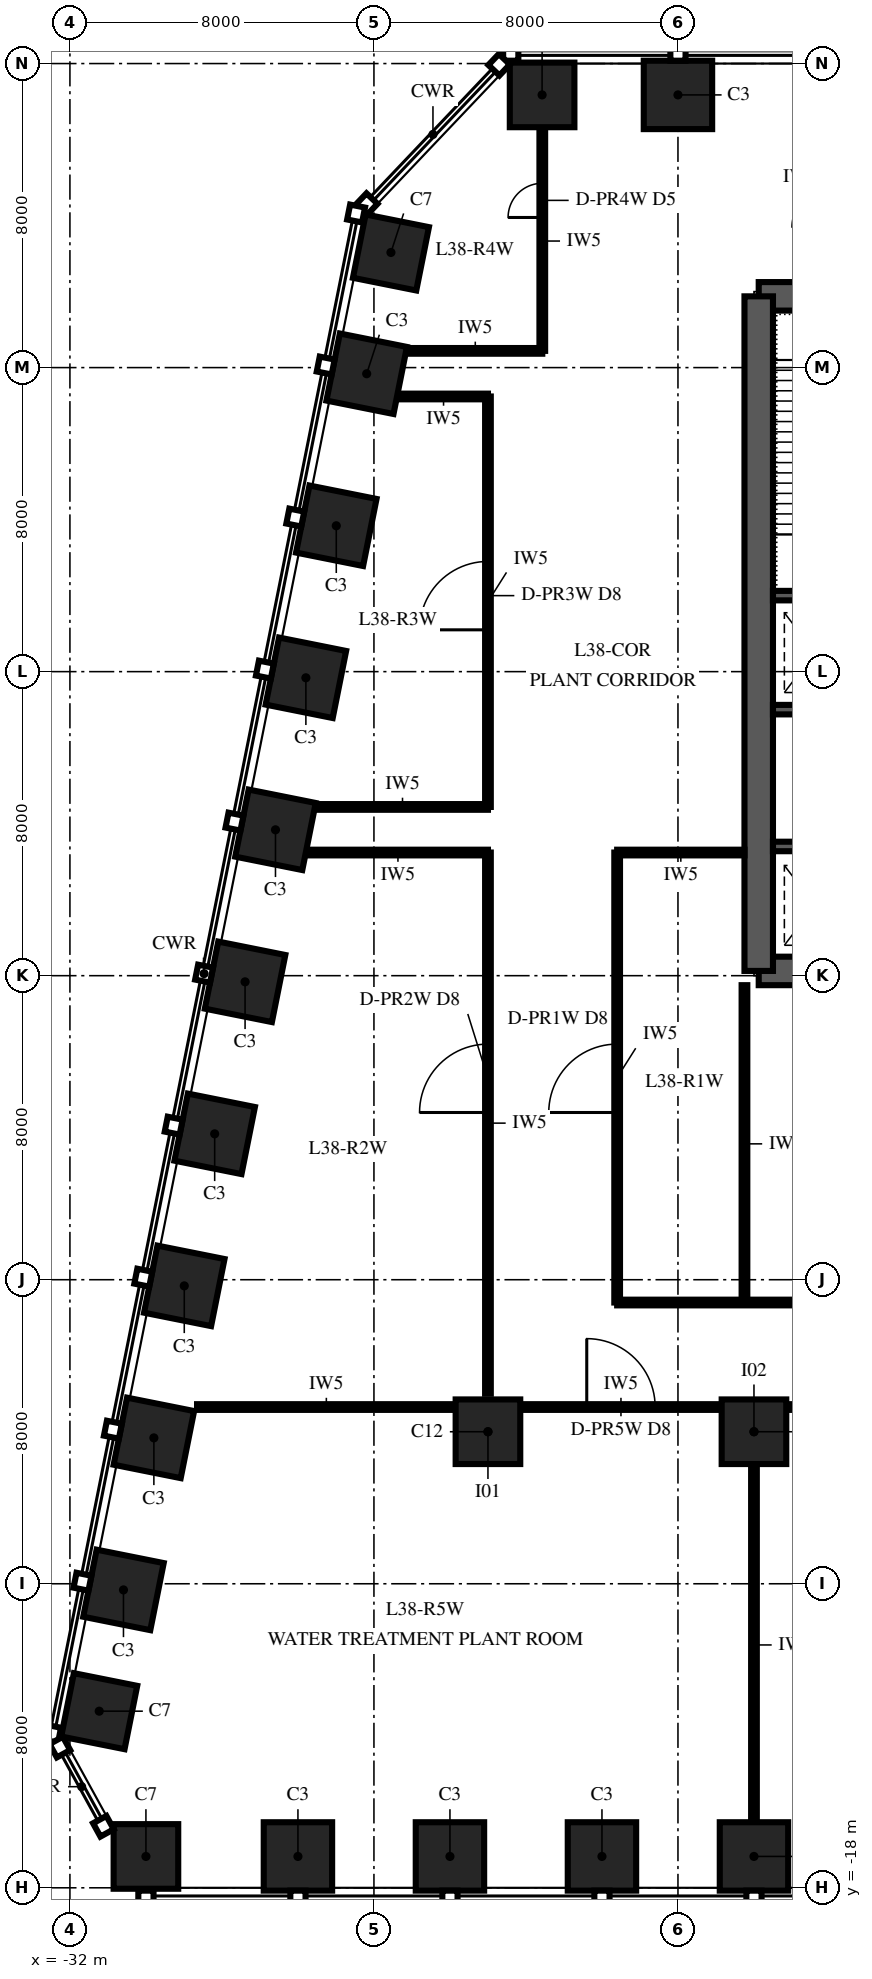
"""IFC4 building model, lengths in metres.
Left out: names, types, materials, properties, quantities, classifications, styles, units other than length and angle.
Written with IfcOpenShell. Run it as: python <this file> out.ifc"""

import sys

from ifc_helpers import new_model, si_unit, direction, frame, frame_2d, origin, origin_2d, place, context, subcontext, project, spatial, polyline, rectangle, outline, extrude, element, fill, save


model = new_model("IFC4")
c1 = context("Model", 3, precision=1e-05, world=origin(), true_north=direction((0.0, 1.0)))
c2 = subcontext(c1, "Body", "Model", "MODEL_VIEW")
j1 = project(units=[si_unit("LENGTHUNIT", "METRE"), si_unit("PLANEANGLEUNIT", "RADIAN")], contexts=[c1])
p1 = place(None, origin())
s1 = spatial("IfcSite", under=j1, at=p1, CompositionType="ELEMENT")
p2 = place(p1, origin())
s2 = spatial("IfcBuilding", under=s1, at=p2, CompositionType="ELEMENT")
p3 = place(p2, frame((0.0, 0.0, 167.0)))
s3 = spatial("IfcBuildingStorey", under=s2, at=p3, CompositionType="ELEMENT", Elevation=167.0)
p4 = place(p3, frame((-30.0, -17.175, 0.0), z_axis=(0.0, 0.0, 1.0), x_axis=(1.0, 0.0, 0.0)))
e1 = element("IfcColumn", 1, at=p4, inside=s3, PredefinedType="COLUMN", context=c2, shape_type="SweptSolid", body=[
    extrude(rectangle(XDim=1.7, YDim=1.7, at=origin_2d()), origin(), (0.0, 0.0, 1.0), 6.0),
])
for number, where, z_axis, x_axis in (
    (2, (-26.0, -17.175, 0.0), (0.0, 0.0, 1.0), (1.0, 0.0, 0.0)),
    (3, (-22.0, -17.175, 0.0), (0.0, 0.0, 1.0), (1.0, 0.0, 0.0)),
    (4, (-18.0, -17.175, 0.0), (0.0, 0.0, 1.0), (1.0, 0.0, 0.0)),
    (5, (-14.0, -17.175, 0.0), (0.0, 0.0, 1.0), (1.0, 0.0, 0.0)),
    (6, (-16.0, 29.175, 0.0), (0.0, 0.0, 1.0), (-1.0, 0.0, 0.0)),
):
    element("IfcColumn", number, at=place(p3, frame(where, z_axis=z_axis, x_axis=x_axis)), inside=s3, PredefinedType="COLUMN", context=c2, shape_type="SweptSolid", body=[
        extrude(rectangle(XDim=1.8, YDim=1.8, at=origin_2d()), origin(), (0.0, 0.0, 1.0), 6.0),
    ])
for number, where, z_axis, x_axis in (
    (7, (-19.575, 29.175, 0.0), (0.0, 0.0, 1.0), (-1.0, 0.0, 0.0)),
    (8, (-23.553, 25.029, 0.0), (0.0, 0.0, 1.0), (-0.196, -0.981, 0.0)),
):
    element("IfcColumn", number, at=place(p3, frame(where, z_axis=z_axis, x_axis=x_axis)), inside=s3, PredefinedType="COLUMN", context=c2, shape_type="SweptSolid", body=[
        extrude(rectangle(XDim=1.7, YDim=1.7, at=origin_2d()), origin(), (0.0, 0.0, 1.0), 6.0),
    ])
for number, where, z_axis, x_axis in (
    (9, (-24.191, 21.838, 0.0), (0.0, 0.0, 1.0), (-0.196, -0.981, 0.0)),
    (10, (-24.991, 17.838, 0.0), (0.0, 0.0, 1.0), (-0.196, -0.981, 0.0)),
    (11, (-25.791, 13.838, 0.0), (0.0, 0.0, 1.0), (-0.196, -0.981, 0.0)),
    (12, (-26.591, 9.838, 0.0), (0.0, 0.0, 1.0), (-0.196, -0.981, 0.0)),
    (13, (-27.391, 5.838, 0.0), (0.0, 0.0, 1.0), (-0.196, -0.981, 0.0)),
    (14, (-28.191, 1.838, 0.0), (0.0, 0.0, 1.0), (-0.196, -0.981, 0.0)),
    (15, (-28.991, -2.162, 0.0), (0.0, 0.0, 1.0), (-0.196, -0.981, 0.0)),
    (16, (-29.791, -6.162, 0.0), (0.0, 0.0, 1.0), (-0.196, -0.981, 0.0)),
    (17, (-30.591, -10.162, 0.0), (0.0, 0.0, 1.0), (-0.196, -0.981, 0.0)),
):
    element("IfcColumn", number, at=place(p3, frame(where, z_axis=z_axis, x_axis=x_axis)), inside=s3, PredefinedType="COLUMN", context=c2, shape_type="SweptSolid", body=[
        extrude(rectangle(XDim=1.8, YDim=1.8, at=origin_2d()), origin(), (0.0, 0.0, 1.0), 6.0),
    ])
for number, where, z_axis, x_axis in (
    (18, (-31.229, -13.353, 0.0), (0.0, 0.0, 1.0), (-0.196, -0.981, 0.0)),
    (19, (-21.0, -6.0, 0.0), (0.0, 0.0, 1.0), (1.0, 0.0, 0.0)),
    (20, (-14.0, -6.0, 0.0), (0.0, 0.0, 1.0), (1.0, 0.0, 0.0)),
):
    element("IfcColumn", number, at=place(p3, frame(where, z_axis=z_axis, x_axis=x_axis)), inside=s3, PredefinedType="COLUMN", context=c2, shape_type="SweptSolid", body=[
        extrude(rectangle(XDim=1.7, YDim=1.7, at=origin_2d()), origin(), (0.0, 0.0, 1.0), 6.0),
    ])
p5 = place(p3, frame((-13.875, 6.125, 0.0), z_axis=(0.0, 0.0, 1.0), x_axis=(1.0, 0.0, 0.0)))
e21 = element("IfcWall", 21, at=p5, inside=s3, PredefinedType="SHEAR", context=c2, shape_type="SweptSolid", body=[
    extrude(rectangle(XDim=27.75, YDim=0.75, at=frame_2d((13.875, 0.0))), origin(), (0.0, 0.0, 1.0), 6.0),
])
p6 = place(p3, frame((13.875, 23.875, 0.0), z_axis=(0.0, 0.0, 1.0), x_axis=(-1.0, 0.0, 0.0)))
e22 = element("IfcWall", 22, at=p6, inside=s3, PredefinedType="SHEAR", context=c2, shape_type="SweptSolid", body=[
    extrude(rectangle(XDim=27.75, YDim=0.75, at=frame_2d((13.875, 0.0))), origin(), (0.0, 0.0, 1.0), 6.0),
])
p7 = place(p6, frame((21.775, 0.0, 0.0)))
e23 = element("IfcOpeningElement", 23, at=p7, cuts=e22, PredefinedType="OPENING", context=c2, shape_type="SweptSolid", body=[
    extrude(rectangle(XDim=1.0, YDim=2.1, at=frame_2d((0.5, 1.05))), frame((0.0, 0.39, 0.0), z_axis=(0.0, -1.0, 0.0), x_axis=(1.0, 0.0, 0.0)), (0.0, 0.0, 1.0), 0.78),
])
p8 = place(p6, frame((4.975, 0.0, 0.0)))
e24 = element("IfcOpeningElement", 24, at=p8, cuts=e22, PredefinedType="OPENING", context=c2, shape_type="SweptSolid", body=[
    extrude(rectangle(XDim=1.0, YDim=2.1, at=frame_2d((0.5, 1.05))), frame((0.0, 0.39, 0.0), z_axis=(0.0, -1.0, 0.0), x_axis=(1.0, 0.0, 0.0)), (0.0, 0.0, 1.0), 0.78),
])
p9 = place(p6, frame((17.375, 0.0, 0.0)))
e25 = element("IfcOpeningElement", 25, at=p9, cuts=e22, PredefinedType="OPENING", context=c2, shape_type="SweptSolid", body=[
    extrude(rectangle(XDim=1.0, YDim=2.1, at=frame_2d((0.5, 1.05))), frame((0.0, 0.39, 0.0), z_axis=(0.0, -1.0, 0.0), x_axis=(1.0, 0.0, 0.0)), (0.0, 0.0, 1.0), 0.78),
])
p10 = place(p6, frame((13.375, 0.0, 0.0)))
e26 = element("IfcOpeningElement", 26, at=p10, cuts=e22, PredefinedType="OPENING", context=c2, shape_type="SweptSolid", body=[
    extrude(rectangle(XDim=1.0, YDim=2.1, at=frame_2d((0.5, 1.05))), frame((0.0, 0.39, 0.0), z_axis=(0.0, -1.0, 0.0), x_axis=(1.0, 0.0, 0.0)), (0.0, 0.0, 1.0), 0.78),
])
p11 = place(p6, frame((9.375, 0.0, 0.0)))
e27 = element("IfcOpeningElement", 27, at=p11, cuts=e22, PredefinedType="OPENING", context=c2, shape_type="SweptSolid", body=[
    extrude(rectangle(XDim=1.0, YDim=2.1, at=frame_2d((0.5, 1.05))), frame((0.0, 0.39, 0.0), z_axis=(0.0, -1.0, 0.0), x_axis=(1.0, 0.0, 0.0)), (0.0, 0.0, 1.0), 0.78),
])
p12 = place(p3, frame((-13.875, 23.875, 0.0), z_axis=(0.0, 0.0, 1.0), x_axis=(0.0, -1.0, 0.0)))
e28 = element("IfcWall", 28, at=p12, inside=s3, PredefinedType="SHEAR", context=c2, shape_type="SweptSolid", body=[
    extrude(outline(polyline([(0.0, -0.375), (17.75, -0.375), (17.75, 0.0), (17.375, 0.0), (17.375, 0.375), (0.375, 0.375), (0.375, 0.0), (0.0, 0.0), (0.0, -0.375)])), origin(), (0.0, 0.0, 1.0), 6.0),
])
for number, where, z_axis, x_axis in (
    (29, (-13.5, 9.4, 0.0), (0.0, 0.0, 1.0), (1.0, 0.0, 0.0)),
    (30, (-13.5, 13.0, 0.0), (0.0, 0.0, 1.0), (1.0, 0.0, 0.0)),
    (31, (-13.5, 16.0, 0.0), (0.0, 0.0, 1.0), (1.0, 0.0, 0.0)),
):
    element("IfcWall", number, at=place(p3, frame(where, z_axis=z_axis, x_axis=x_axis)), inside=s3, PredefinedType="SHEAR", context=c2, shape_type="SweptSolid", body=[
        extrude(rectangle(XDim=27.0, YDim=0.25, at=frame_2d((13.5, 0.0))), origin(), (0.0, 0.0, 1.0), 6.0),
    ])
p13 = place(p3, frame((-17.6, -2.6, 0.0), z_axis=(0.0, 0.0, 1.0), x_axis=(0.0, 1.0, 0.0)))
e32 = element("IfcWall", 32, at=p13, inside=s3, PredefinedType="PARTITIONING", context=c2, shape_type="SweptSolid", body=[
    extrude(rectangle(XDim=11.84, YDim=0.15, at=frame_2d((5.92, 0.0))), origin(), (0.0, 0.0, 1.0), 5.8),
])
p14 = place(p13, frame((5.0, 0.0, 0.0)))
e33 = element("IfcOpeningElement", 33, at=p14, cuts=e32, PredefinedType="OPENING", context=c2, shape_type="SweptSolid", body=[
    extrude(rectangle(XDim=1.8, YDim=2.4, at=frame_2d((0.9, 1.2))), frame((0.0, 0.09, 0.0), z_axis=(0.0, -1.0, 0.0), x_axis=(1.0, 0.0, 0.0)), (0.0, 0.0, 1.0), 0.18),
])
p15 = place(p3, frame((-21.0, -5.0, 0.0), z_axis=(0.0, 0.0, 1.0), x_axis=(0.0, 1.0, 0.0)))
e34 = element("IfcWall", 34, at=p15, inside=s3, PredefinedType="PARTITIONING", context=c2, shape_type="SweptSolid", body=[
    extrude(rectangle(XDim=14.24, YDim=0.15, at=frame_2d((7.12, 0.0))), origin(), (0.0, 0.0, 1.0), 5.8),
])
p16 = place(p15, frame((7.4, 0.0, 0.0)))
e35 = element("IfcOpeningElement", 35, at=p16, cuts=e34, PredefinedType="OPENING", context=c2, shape_type="SweptSolid", body=[
    extrude(rectangle(XDim=1.8, YDim=2.4, at=frame_2d((0.9, 1.2))), frame((0.0, 0.09, 0.0), z_axis=(0.0, -1.0, 0.0), x_axis=(1.0, 0.0, 0.0)), (0.0, 0.0, 1.0), 0.18),
])
p17 = place(p3, frame((-21.0, 10.44, 0.0), z_axis=(0.0, 0.0, 1.0), x_axis=(0.0, 1.0, 0.0)))
e36 = element("IfcWall", 36, at=p17, inside=s3, PredefinedType="PARTITIONING", context=c2, shape_type="SweptSolid", body=[
    extrude(rectangle(XDim=10.8, YDim=0.15, at=frame_2d((5.4, 0.0))), origin(), (0.0, 0.0, 1.0), 5.8),
])
p18 = place(p17, frame((4.66, 0.0, 0.0)))
e37 = element("IfcOpeningElement", 37, at=p18, cuts=e36, PredefinedType="OPENING", context=c2, shape_type="SweptSolid", body=[
    extrude(rectangle(XDim=1.8, YDim=2.4, at=frame_2d((0.9, 1.2))), frame((0.0, 0.09, 0.0), z_axis=(0.0, -1.0, 0.0), x_axis=(1.0, 0.0, 0.0)), (0.0, 0.0, 1.0), 0.18),
])
p19 = place(p3, frame((-14.25, -2.6, 0.0), z_axis=(0.0, 0.0, 1.0), x_axis=(0.0, 1.0, 0.0)))
e38 = element("IfcWall", 38, at=p19, inside=s3, PredefinedType="PARTITIONING", context=c2, shape_type="SweptSolid", body=[
    extrude(rectangle(XDim=8.35, YDim=0.15, at=frame_2d((4.175, 0.0))), origin(), (0.0, 0.0, 1.0), 5.8),
])
p20 = place(p3, frame((-14.25, 9.24, 0.0), z_axis=(0.0, 0.0, 1.0), x_axis=(-1.0, 0.0, 0.0)))
e39 = element("IfcWall", 39, at=p20, inside=s3, PredefinedType="PARTITIONING", context=c2, shape_type="SweptSolid", body=[
    extrude(rectangle(XDim=3.35, YDim=0.15, at=frame_2d((1.675, 0.0))), origin(), (0.0, 0.0, 1.0), 5.18),
])
p21 = place(p3, frame((-21.0, 9.24, 0.0), z_axis=(0.0, 0.0, 1.0), x_axis=(-1.0, 0.0, 0.0)))
e40 = element("IfcWall", 40, at=p21, inside=s3, PredefinedType="PARTITIONING", context=c2, shape_type="SweptSolid", body=[
    extrude(rectangle(XDim=4.737, YDim=0.15, at=frame_2d((2.368, 0.0))), origin(), (0.0, 0.0, 1.0), 5.8),
])
p22 = place(p3, frame((-21.0, 10.44, 0.0), z_axis=(0.0, 0.0, 1.0), x_axis=(-1.0, 0.0, 0.0)))
e41 = element("IfcWall", 41, at=p22, inside=s3, PredefinedType="PARTITIONING", context=c2, shape_type="SweptSolid", body=[
    extrude(rectangle(XDim=4.497, YDim=0.15, at=frame_2d((2.248, 0.0))), origin(), (0.0, 0.0, 1.0), 5.8),
])
p23 = place(p3, frame((-21.0, 21.24, 0.0), z_axis=(0.0, 0.0, 1.0), x_axis=(-1.0, 0.0, 0.0)))
e42 = element("IfcWall", 42, at=p23, inside=s3, PredefinedType="PARTITIONING", context=c2, shape_type="SweptSolid", body=[
    extrude(rectangle(XDim=2.337, YDim=0.15, at=frame_2d((1.168, 0.0))), origin(), (0.0, 0.0, 1.0), 5.8),
])
p24 = place(p3, frame((-19.57, 22.44, 0.0), z_axis=(0.0, 0.0, 1.0), x_axis=(-1.0, 0.0, 0.0)))
e43 = element("IfcWall", 43, at=p24, inside=s3, PredefinedType="PARTITIONING", context=c2, shape_type="SweptSolid", body=[
    extrude(rectangle(XDim=3.527, YDim=0.15, at=frame_2d((1.763, 0.0))), origin(), (0.0, 0.0, 1.0), 5.8),
])
p25 = place(p3, frame((-19.57, 22.44, 0.0), z_axis=(0.0, 0.0, 1.0), x_axis=(0.0, 1.0, 0.0)))
e44 = element("IfcWall", 44, at=p25, inside=s3, PredefinedType="PARTITIONING", context=c2, shape_type="SweptSolid", body=[
    extrude(rectangle(XDim=5.78, YDim=0.15, at=frame_2d((2.89, 0.0))), origin(), (0.0, 0.0, 1.0), 5.368),
])
p26 = place(p25, frame((3.51, 0.0, 0.0)))
e45 = element("IfcOpeningElement", 45, at=p26, cuts=e44, PredefinedType="OPENING", context=c2, shape_type="SweptSolid", body=[
    extrude(rectangle(XDim=0.9, YDim=2.1, at=frame_2d((0.45, 1.05))), frame((0.0, 0.09, 0.0), z_axis=(0.0, -1.0, 0.0), x_axis=(1.0, 0.0, 0.0)), (0.0, 0.0, 1.0), 0.18),
])
p27 = place(p3, frame((-14.0, -7.0, 0.0), z_axis=(0.0, 0.0, 1.0), x_axis=(0.0, -1.0, 0.0)))
e46 = element("IfcWall", 46, at=p27, inside=s3, PredefinedType="PARTITIONING", context=c2, shape_type="SweptSolid", body=[
    extrude(rectangle(XDim=9.22, YDim=0.15, at=frame_2d((4.61, 0.0))), origin(), (0.0, 0.0, 1.0), 5.18),
])
p28 = place(p3, frame((-28.655, -5.35, 0.0), z_axis=(0.0, 0.0, 1.0), x_axis=(1.0, 0.0, 0.0)))
e47 = element("IfcWall", 47, at=p28, inside=s3, PredefinedType="PARTITIONING", context=c2, shape_type="SweptSolid", body=[
    extrude(rectangle(XDim=6.805, YDim=0.15, at=frame_2d((3.402, 0.0))), origin(), (0.0, 0.0, 1.0), 5.8),
])
p29 = place(p3, frame((-20.15, -5.35, 0.0), z_axis=(0.0, 0.0, 1.0), x_axis=(1.0, 0.0, 0.0)))
e48 = element("IfcWall", 48, at=p29, inside=s3, PredefinedType="PARTITIONING", context=c2, shape_type="SweptSolid", body=[
    extrude(rectangle(XDim=5.3, YDim=0.15, at=frame_2d((2.65, 0.0))), origin(), (0.0, 0.0, 1.0), 5.8),
])
p30 = place(p29, frame((1.75, 0.0, 0.0)))
e49 = element("IfcOpeningElement", 49, at=p30, cuts=e48, PredefinedType="OPENING", context=c2, shape_type="SweptSolid", body=[
    extrude(rectangle(XDim=1.8, YDim=2.4, at=frame_2d((0.9, 1.2))), frame((0.0, 0.09, 0.0), z_axis=(0.0, -1.0, 0.0), x_axis=(1.0, 0.0, 0.0)), (0.0, 0.0, 1.0), 0.18),
])
p31 = place(p3, frame((-13.15, -5.35, 0.0), z_axis=(0.0, 0.0, 1.0), x_axis=(1.0, 0.0, 0.0)))
e50 = element("IfcWall", 50, at=p31, inside=s3, PredefinedType="PARTITIONING", context=c2, shape_type="SweptSolid", body=[
    extrude(rectangle(XDim=5.3, YDim=0.15, at=frame_2d((2.65, 0.0))), origin(), (0.0, 0.0, 1.0), 5.8),
])
p32 = place(p3, frame((-17.6, -2.6, 0.0), z_axis=(0.0, 0.0, 1.0), x_axis=(1.0, 0.0, 0.0)))
e51 = element("IfcWall", 51, at=p32, inside=s3, PredefinedType="PARTITIONING", context=c2, shape_type="SweptSolid", body=[
    extrude(rectangle(XDim=35.2, YDim=0.15, at=frame_2d((17.6, 0.0))), origin(), (0.0, 0.0, 1.0), 5.8),
])
p33 = place(p32, frame((9.7, 0.0, 0.0)))
e52 = element("IfcOpeningElement", 52, at=p33, cuts=e51, PredefinedType="OPENING", context=c2, shape_type="SweptSolid", body=[
    extrude(rectangle(XDim=1.8, YDim=2.4, at=frame_2d((0.9, 1.2))), frame((0.0, 0.09, 0.0), z_axis=(0.0, -1.0, 0.0), x_axis=(1.0, 0.0, 0.0)), (0.0, 0.0, 1.0), 0.18),
])
p34 = place(p32, frame((23.7, 0.0, 0.0)))
e53 = element("IfcOpeningElement", 53, at=p34, cuts=e51, PredefinedType="OPENING", context=c2, shape_type="SweptSolid", body=[
    extrude(rectangle(XDim=1.8, YDim=2.4, at=frame_2d((0.9, 1.2))), frame((0.0, 0.09, 0.0), z_axis=(0.0, -1.0, 0.0), x_axis=(1.0, 0.0, 0.0)), (0.0, 0.0, 1.0), 0.18),
])
p35 = place(p14, origin())
e54 = element("IfcDoor", 54, at=p35, inside=s3, OperationType="DOUBLE_DOOR_SINGLE_SWING", PredefinedType="DOOR", context=c2, shape_type="SweptSolid", body=[
    extrude(rectangle(XDim=1.8, YDim=2.4, at=frame_2d((0.9, 1.2))), frame((0.0, 0.075, 0.0), z_axis=(0.0, -1.0, 0.0), x_axis=(1.0, 0.0, 0.0)), (0.0, 0.0, 1.0), 0.149),
])
fill(e33, e54)
p36 = place(p16, origin())
e55 = element("IfcDoor", 55, at=p36, inside=s3, OperationType="DOUBLE_DOOR_SINGLE_SWING", PredefinedType="DOOR", context=c2, shape_type="SweptSolid", body=[
    extrude(rectangle(XDim=1.8, YDim=2.4, at=frame_2d((0.9, 1.2))), frame((0.0, 0.075, 0.0), z_axis=(0.0, -1.0, 0.0), x_axis=(1.0, 0.0, 0.0)), (0.0, 0.0, 1.0), 0.149),
])
fill(e35, e55)
p37 = place(p18, origin())
e56 = element("IfcDoor", 56, at=p37, inside=s3, OperationType="DOUBLE_DOOR_SINGLE_SWING", PredefinedType="DOOR", context=c2, shape_type="SweptSolid", body=[
    extrude(rectangle(XDim=1.8, YDim=2.4, at=frame_2d((0.9, 1.2))), frame((0.0, 0.075, 0.0), z_axis=(0.0, -1.0, 0.0), x_axis=(1.0, 0.0, 0.0)), (0.0, 0.0, 1.0), 0.149),
])
fill(e37, e56)
p38 = place(p26, origin())
e57 = element("IfcDoor", 57, at=p38, inside=s3, OperationType="SINGLE_SWING_LEFT", PredefinedType="DOOR", context=c2, shape_type="SweptSolid", body=[
    extrude(rectangle(XDim=0.9, YDim=2.1, at=frame_2d((0.45, 1.05))), frame((0.0, 0.075, 0.0), z_axis=(0.0, -1.0, 0.0), x_axis=(1.0, 0.0, 0.0)), (0.0, 0.0, 1.0), 0.149),
])
fill(e45, e57)
p39 = place(p30, origin())
e58 = element("IfcDoor", 58, at=p39, inside=s3, OperationType="DOUBLE_DOOR_SINGLE_SWING", PredefinedType="DOOR", context=c2, shape_type="SweptSolid", body=[
    extrude(rectangle(XDim=1.8, YDim=2.4, at=frame_2d((0.9, 1.2))), frame((0.0, 0.075, 0.0), z_axis=(0.0, -1.0, 0.0), x_axis=(1.0, 0.0, 0.0)), (0.0, 0.0, 1.0), 0.149),
])
fill(e49, e58)
save(model, sys.argv[1])
